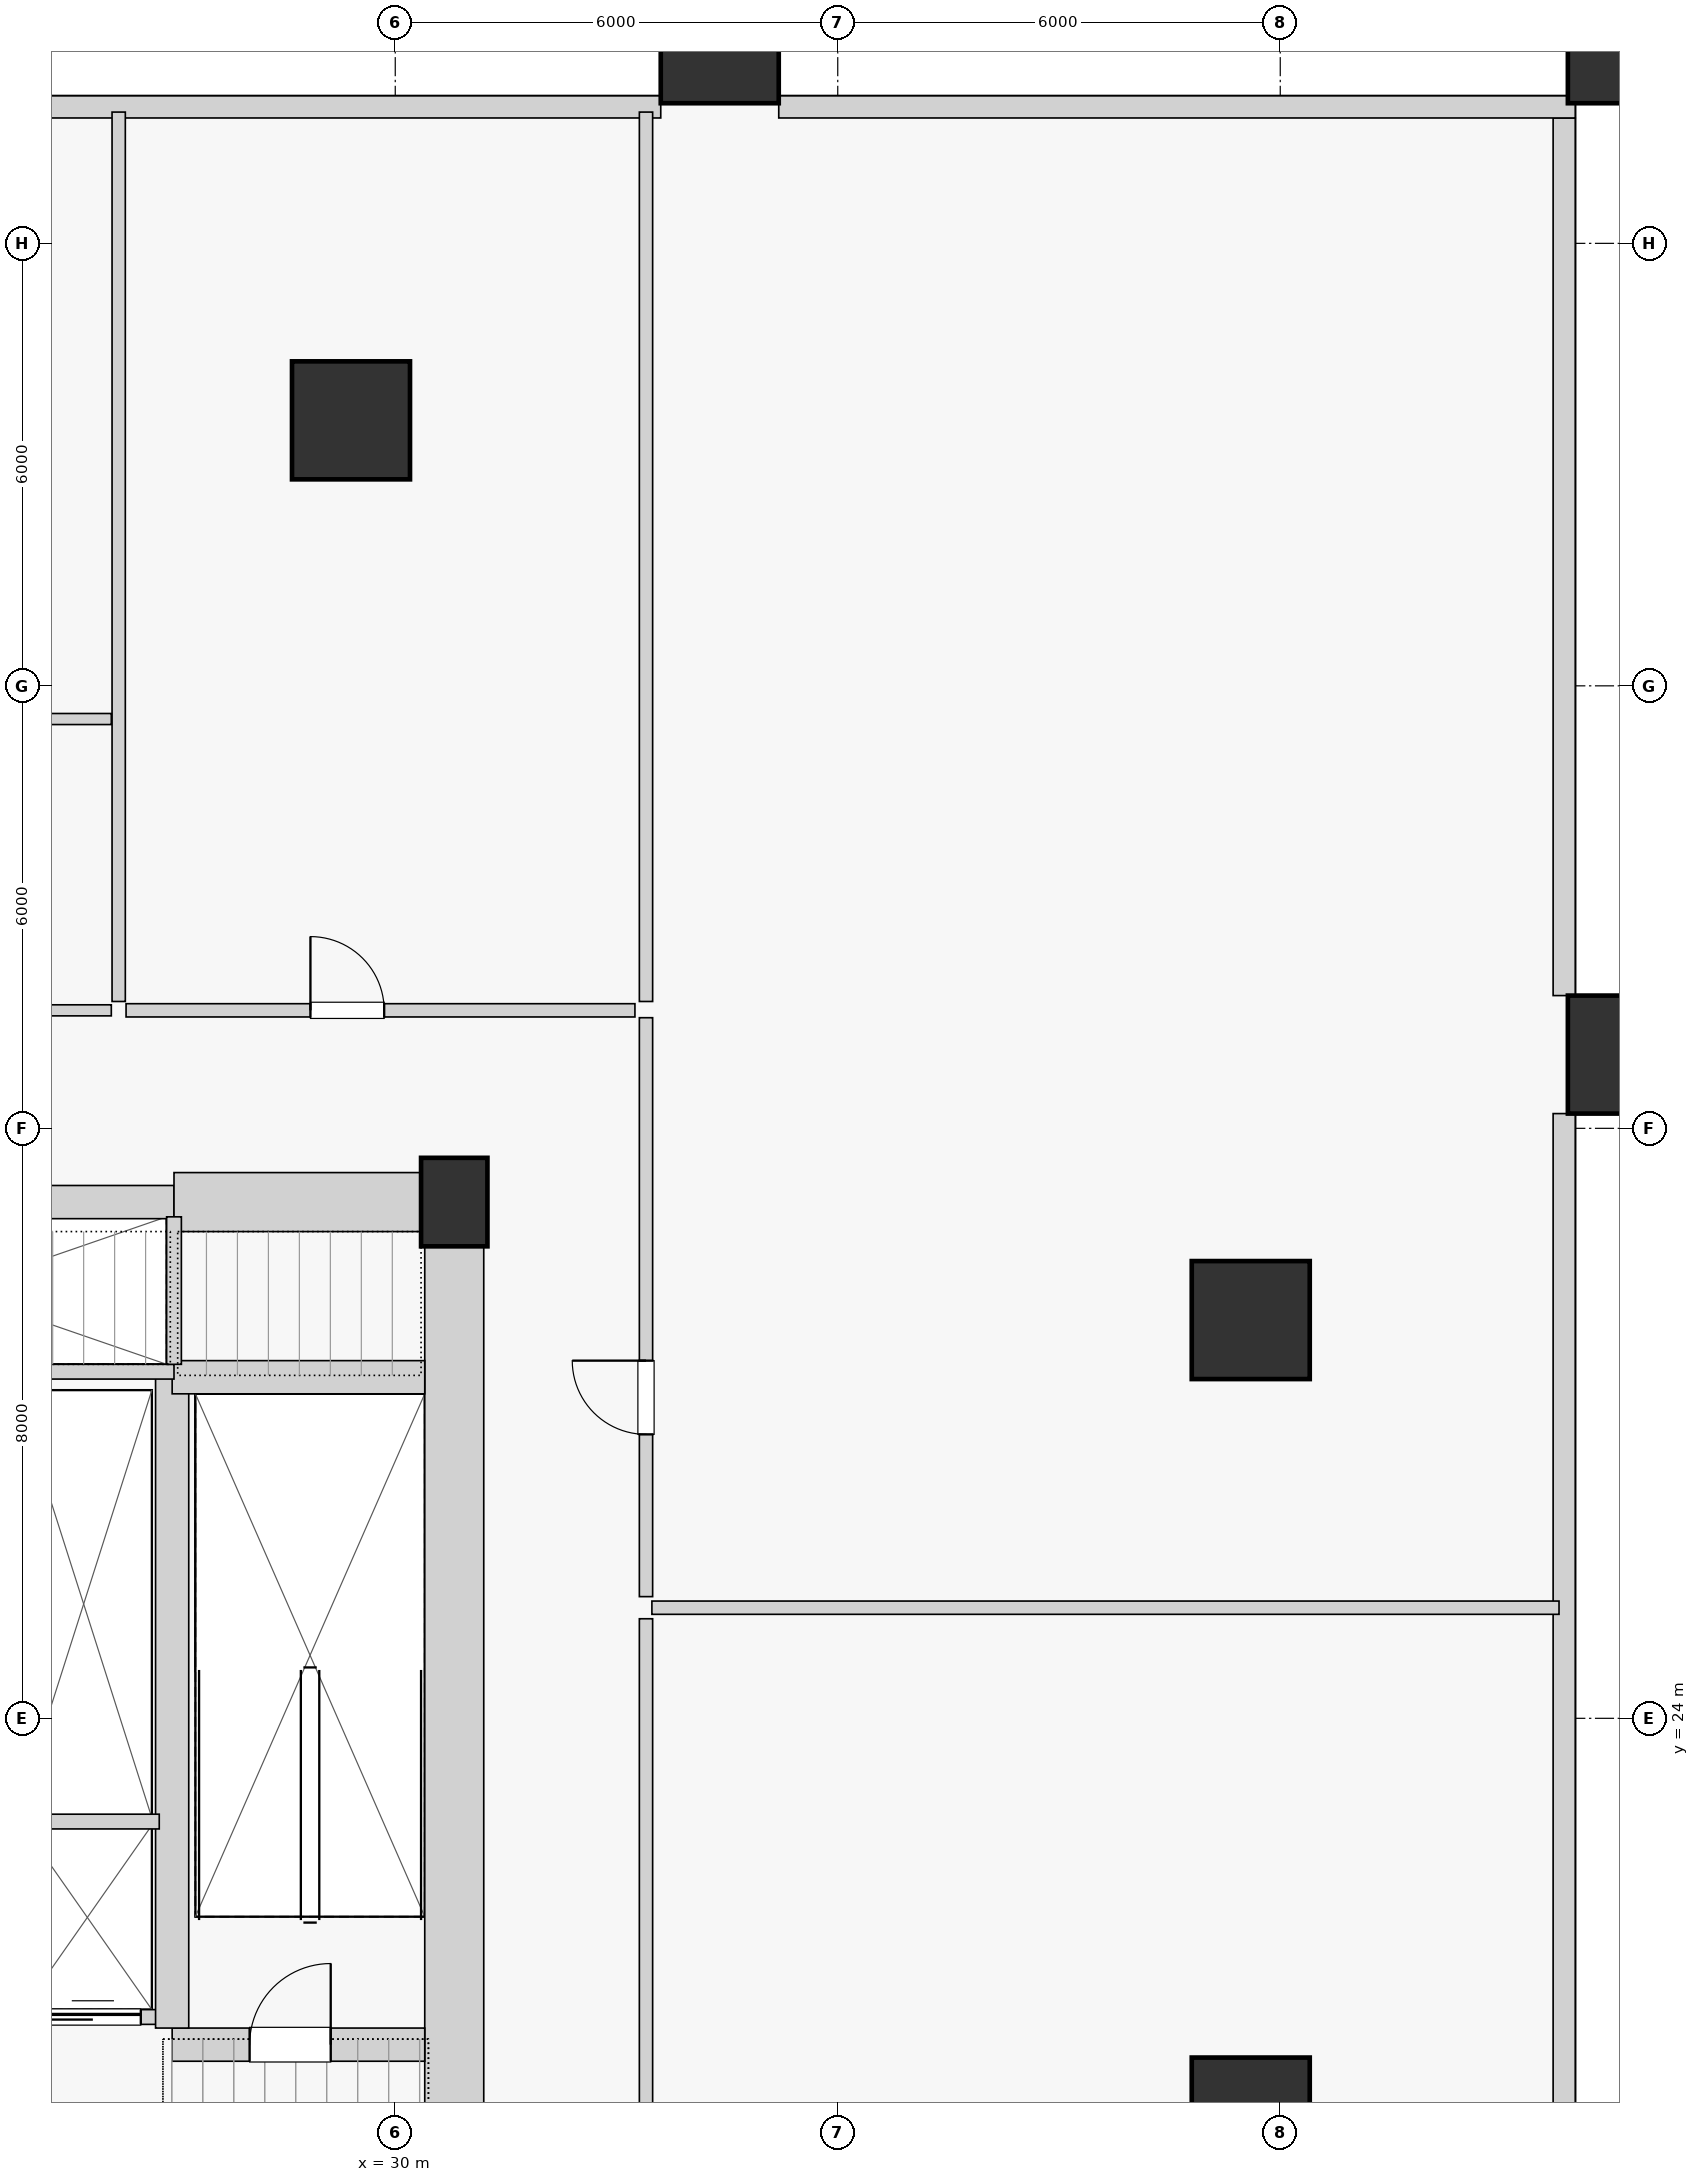
"""IFC4 building model, lengths in metres.
Left out: names, types, materials, properties, quantities, classifications, styles, units other than length and angle.
Written with IfcOpenShell. Run it as: python <this file> out.ifc"""

import sys

from ifc_helpers import new_model, si_unit, direction, frame, frame_2d, origin, origin_2d, place, context, subcontext, project, spatial, rectangle, extrude, source, transform, mapped, element, fill, save


model = new_model("IFC4")
c1 = context("Model", 3, precision=1e-05, world=origin(), true_north=direction((0.0, 1.0)))
c2 = subcontext(c1, "Body", "Model", "MODEL_VIEW")
j1 = project(units=[si_unit("LENGTHUNIT", "METRE"), si_unit("PLANEANGLEUNIT", "RADIAN")], contexts=[c1])
p1 = place(None, origin())
s1 = spatial("IfcSite", under=j1, at=p1, CompositionType="ELEMENT")
p2 = place(p1, origin())
s2 = spatial("IfcBuilding", under=s1, at=p2, CompositionType="ELEMENT")
p3 = place(p2, frame((0.0, 0.0, 18.4)))
s3 = spatial("IfcBuildingStorey", under=s2, at=p3, CompositionType="ELEMENT", Elevation=18.4)
p4 = place(p3, frame((30.8, 31.0, 0.0), z_axis=(0.0, 0.0, 1.0), x_axis=(1.0, 0.0, 0.0)))
e1 = element("IfcColumn", 1, at=p4, inside=s3, PredefinedType="PILASTER", context=c2, shape_type="SweptSolid", body=[
    extrude(rectangle(XDim=0.9, YDim=1.2, at=origin_2d()), origin(), (0.0, 0.0, 1.0), 4.4),
])
for number, where, z_axis, x_axis in (
    (2, (46.7, 33.0, 0.0), (0.0, 0.0, 1.0), (1.0, 0.0, 0.0)),
    (3, (34.4, 46.7, 0.0), (0.0, 0.0, 1.0), (1.0, 0.0, 0.0)),
    (4, (46.7, 46.7, 0.0), (0.0, 0.0, 1.0), (1.0, 0.0, 0.0)),
    (5, (41.6, 18.6, 0.0), (0.0, 0.0, 1.0), (1.0, 0.0, 0.0)),
    (6, (41.6, 29.4, 0.0), (0.0, 0.0, 1.0), (1.0, 0.0, 0.0)),
    (7, (29.4, 41.6, 0.0), (0.0, 0.0, 1.0), (1.0, 0.0, 0.0)),
):
    element("IfcColumn", number, at=place(p3, frame(where, z_axis=z_axis, x_axis=x_axis)), inside=s3, PredefinedType="COLUMN", context=c2, shape_type="SweptSolid", body=[
        extrude(rectangle(XDim=1.6, YDim=1.6, at=origin_2d()), origin(), (0.0, 0.0, 1.0), 4.4),
    ])
p5 = place(p3, frame((45.85, 15.8, 0.0), z_axis=(0.0, 0.0, 1.0), x_axis=(0.0, 1.0, 0.0)))
e8 = element("IfcWall", 8, at=p5, inside=s3, PredefinedType="SOLIDWALL", context=c2, shape_type="SweptSolid", body=[
    extrude(rectangle(XDim=16.4, YDim=0.3, at=frame_2d((8.2, 0.0))), origin(), (0.0, 0.0, 1.0), 2.95),
])
p6 = place(p5, frame((7.15, 0.0, 0.85)))
e9 = element("IfcOpeningElement", 9, at=p6, cuts=e8, PredefinedType="OPENING", context=c2, shape_type="SweptSolid", body=[
    extrude(rectangle(XDim=2.1, YDim=1.75, at=frame_2d((1.05, 0.875))), frame((0.0, 0.16, 0.0), z_axis=(0.0, -1.0, 0.0), x_axis=(1.0, 0.0, 0.0)), (0.0, 0.0, 1.0), 0.32),
])
p7 = place(p3, frame((45.85, 33.8, 0.0), z_axis=(0.0, 0.0, 1.0), x_axis=(0.0, 1.0, 0.0)))
e10 = element("IfcWall", 10, at=p7, inside=s3, PredefinedType="SOLIDWALL", context=c2, shape_type="SweptSolid", body=[
    extrude(rectangle(XDim=11.9, YDim=0.3, at=frame_2d((5.95, 0.0))), origin(), (0.0, 0.0, 1.0), 2.95),
])
p8 = place(p7, frame((4.75, 0.0, 0.85)))
e11 = element("IfcOpeningElement", 11, at=p8, cuts=e10, PredefinedType="OPENING", context=c2, shape_type="SweptSolid", body=[
    extrude(rectangle(XDim=2.1, YDim=1.75, at=frame_2d((1.05, 0.875))), frame((0.0, 0.16, 0.0), z_axis=(0.0, -1.0, 0.0), x_axis=(1.0, 0.0, 0.0)), (0.0, 0.0, 1.0), 0.32),
])
p9 = place(p3, frame((46.0, 45.85, 0.0), z_axis=(0.0, 0.0, 1.0), x_axis=(-1.0, 0.0, 0.0)))
e12 = element("IfcWall", 12, at=p9, inside=s3, PredefinedType="SOLIDWALL", context=c2, shape_type="SweptSolid", body=[
    extrude(rectangle(XDim=10.8, YDim=0.3, at=frame_2d((5.4, 0.0))), origin(), (0.0, 0.0, 1.0), 2.95),
])
p10 = place(p9, frame((4.9, 0.0, 0.85)))
e13 = element("IfcOpeningElement", 13, at=p10, cuts=e12, PredefinedType="OPENING", context=c2, shape_type="SweptSolid", body=[
    extrude(rectangle(XDim=2.1, YDim=1.75, at=frame_2d((1.05, 0.875))), frame((0.0, 0.16, 0.0), z_axis=(0.0, -1.0, 0.0), x_axis=(1.0, 0.0, 0.0)), (0.0, 0.0, 1.0), 0.32),
])
p11 = place(p3, frame((33.6, 45.85, 0.0), z_axis=(0.0, 0.0, 1.0), x_axis=(-1.0, 0.0, 0.0)))
e14 = element("IfcWall", 14, at=p11, inside=s3, PredefinedType="SOLIDWALL", context=c2, shape_type="SweptSolid", body=[
    extrude(rectangle(XDim=8.8, YDim=0.3, at=frame_2d((4.4, 0.0))), origin(), (0.0, 0.0, 1.0), 2.95),
])
p12 = place(p11, frame((3.6, 0.0, 0.85)))
e15 = element("IfcOpeningElement", 15, at=p12, cuts=e14, PredefinedType="OPENING", context=c2, shape_type="SweptSolid", body=[
    extrude(rectangle(XDim=1.5, YDim=1.6, at=frame_2d((0.75, 0.8))), frame((0.0, 0.16, 0.0), z_axis=(0.0, -1.0, 0.0), x_axis=(1.0, 0.0, 0.0)), (0.0, 0.0, 1.0), 0.32),
])
p13 = place(p3, frame((30.8, 16.8, 0.0), z_axis=(0.0, 0.0, 1.0), x_axis=(0.0, 1.0, 0.0)))
e16 = element("IfcWall", 16, at=p13, inside=s3, PredefinedType="SHEAR", context=c2, shape_type="SweptSolid", body=[
    extrude(rectangle(XDim=14.2, YDim=0.8, at=frame_2d((7.1, 0.0))), origin(), (0.0, 0.0, 1.0), 4.05),
])
p14 = place(p3, frame((21.0, 31.0, 0.0), z_axis=(0.0, 0.0, 1.0), x_axis=(1.0, 0.0, 0.0)))
e17 = element("IfcWall", 17, at=p14, inside=s3, PredefinedType="SHEAR", context=c2, shape_type="SweptSolid", body=[
    extrude(rectangle(XDim=6.0, YDim=0.45, at=frame_2d((3.0, 0.0))), origin(), (0.0, 0.0, 1.0), 4.05),
])
p15 = place(p3, frame((27.0, 31.0, 0.0), z_axis=(0.0, 0.0, 1.0), x_axis=(1.0, 0.0, 0.0)))
e18 = element("IfcWall", 18, at=p15, inside=s3, PredefinedType="SHEAR", context=c2, shape_type="SweptSolid", body=[
    extrude(rectangle(XDim=3.8, YDim=0.8, at=frame_2d((1.9, 0.0))), origin(), (0.0, 0.0, 1.0), 4.05),
])
p16 = place(p3, frame((24.95, 19.95, 0.0), z_axis=(0.0, 0.0, 1.0), x_axis=(1.0, 0.0, 0.0)))
e19 = element("IfcWall", 19, at=p16, inside=s3, PredefinedType="SOLIDWALL", context=c2, shape_type="SweptSolid", body=[
    extrude(rectangle(XDim=1.85, YDim=0.2, at=frame_2d((0.925, 0.0))), origin(), (0.0, 0.0, 1.0), 4.05),
])
p17 = place(p16, frame((0.3, 0.0, 0.0)))
e20 = element("IfcOpeningElement", 20, at=p17, cuts=e19, PredefinedType="OPENING", context=c2, shape_type="SweptSolid", body=[
    extrude(rectangle(XDim=1.3, YDim=2.25, at=frame_2d((0.65, 1.125))), frame((0.0, 0.11, 0.0), z_axis=(0.0, -1.0, 0.0), x_axis=(1.0, 0.0, 0.0)), (0.0, 0.0, 1.0), 0.22),
])
p18 = place(p3, frame((26.975, 19.575, 0.0), z_axis=(0.0, 0.0, 1.0), x_axis=(1.0, 0.0, 0.0)))
e21 = element("IfcWall", 21, at=p18, inside=s3, PredefinedType="SHEAR", context=c2, shape_type="SweptSolid", body=[
    extrude(rectangle(XDim=3.425, YDim=0.45, at=frame_2d((1.712, 0.0))), origin(), (0.0, 0.0, 1.0), 4.05),
])
p19 = place(p18, frame((1.05, 0.0, 0.0)))
e22 = element("IfcOpeningElement", 22, at=p19, cuts=e21, PredefinedType="OPENING", context=c2, shape_type="SweptSolid", body=[
    extrude(rectangle(XDim=1.1, YDim=2.03, at=frame_2d((0.55, 1.015))), frame((0.0, 0.235, 0.0), z_axis=(0.0, -1.0, 0.0), x_axis=(1.0, 0.0, 0.0)), (0.0, 0.0, 1.0), 0.47),
])
p20 = place(p3, frame((26.975, 19.8, 0.0), z_axis=(0.0, 0.0, 1.0), x_axis=(0.0, 1.0, 0.0)))
e23 = element("IfcWall", 23, at=p20, inside=s3, PredefinedType="SHEAR", context=c2, shape_type="SweptSolid", body=[
    extrude(rectangle(XDim=8.825, YDim=0.45, at=frame_2d((4.413, 0.0))), origin(), (0.0, 0.0, 1.0), 4.05),
])
p21 = place(p3, frame((26.975, 28.625, 0.0), z_axis=(0.0, 0.0, 1.0), x_axis=(1.0, 0.0, 0.0)))
e24 = element("IfcWall", 24, at=p21, inside=s3, PredefinedType="SHEAR", context=c2, shape_type="SweptSolid", body=[
    extrude(rectangle(XDim=3.425, YDim=0.45, at=frame_2d((1.712, 0.0))), origin(), (0.0, 0.0, 1.0), 4.05),
])
p22 = place(p3, frame((24.85, 22.6, 0.0), z_axis=(0.0, 0.0, 1.0), x_axis=(1.0, 0.0, 0.0)))
e25 = element("IfcWall", 25, at=p22, inside=s3, PredefinedType="SOLIDWALL", context=c2, shape_type="SweptSolid", body=[
    extrude(rectangle(XDim=1.95, YDim=0.2, at=frame_2d((0.975, 0.0))), origin(), (0.0, 0.0, 1.0), 4.05),
])
p23 = place(p3, frame((21.0, 28.7, 0.0), z_axis=(0.0, 0.0, 1.0), x_axis=(1.0, 0.0, 0.0)))
e26 = element("IfcWall", 26, at=p23, inside=s3, PredefinedType="SOLIDWALL", context=c2, shape_type="SweptSolid", body=[
    extrude(rectangle(XDim=6.0, YDim=0.2, at=frame_2d((3.0, 0.0))), origin(), (0.0, 0.0, 1.0), 4.05),
])
p24 = place(p3, frame((27.0, 28.8, 0.0), z_axis=(0.0, 0.0, 1.0), x_axis=(0.0, 1.0, 0.0)))
e27 = element("IfcWall", 27, at=p24, inside=s3, PredefinedType="SOLIDWALL", context=c2, shape_type="SweptSolid", body=[
    extrude(rectangle(XDim=2.0, YDim=0.2, at=frame_2d((1.0, 0.0))), origin(), (0.0, 0.0, 1.0), 4.05),
])
p25 = place(p3, frame((33.4, 14.3, 0.0), z_axis=(0.0, 0.0, 1.0), x_axis=(0.0, 1.0, 0.0)))
e28 = element("IfcWall", 28, at=p25, inside=s3, PredefinedType="PARTITIONING", context=c2, shape_type="SweptSolid", body=[
    extrude(rectangle(XDim=11.05, YDim=0.18, at=frame_2d((5.525, 0.0))), origin(), (0.0, 0.0, 1.0), 4.05),
])
p26 = place(p25, frame((2.2, 0.0, 0.0)))
e29 = element("IfcOpeningElement", 29, at=p26, cuts=e28, PredefinedType="OPENING", context=c2, shape_type="SweptSolid", body=[
    extrude(rectangle(XDim=1.0, YDim=2.01, at=frame_2d((0.5, 1.005))), frame((0.0, 0.1, 0.0), z_axis=(0.0, -1.0, 0.0), x_axis=(1.0, 0.0, 0.0)), (0.0, 0.0, 1.0), 0.2),
])
p27 = place(p3, frame((33.4, 25.65, 0.0), z_axis=(0.0, 0.0, 1.0), x_axis=(0.0, 1.0, 0.0)))
e30 = element("IfcWall", 30, at=p27, inside=s3, PredefinedType="PARTITIONING", context=c2, shape_type="SweptSolid", body=[
    extrude(rectangle(XDim=7.85, YDim=0.18, at=frame_2d((3.925, 0.0))), origin(), (0.0, 0.0, 1.0), 4.05),
])
p28 = place(p27, frame((2.2, 0.0, 0.0)))
e31 = element("IfcOpeningElement", 31, at=p28, cuts=e30, PredefinedType="OPENING", context=c2, shape_type="SweptSolid", body=[
    extrude(rectangle(XDim=1.0, YDim=2.01, at=frame_2d((0.5, 1.005))), frame((0.0, 0.1, 0.0), z_axis=(0.0, -1.0, 0.0), x_axis=(1.0, 0.0, 0.0)), (0.0, 0.0, 1.0), 0.2),
])
p29 = place(p3, frame((33.48, 25.5, 0.0), z_axis=(0.0, 0.0, 1.0), x_axis=(1.0, 0.0, 0.0)))
e32 = element("IfcWall", 32, at=p29, inside=s3, PredefinedType="PARTITIONING", context=c2, shape_type="SweptSolid", body=[
    extrude(rectangle(XDim=12.3, YDim=0.18, at=frame_2d((6.15, 0.0))), origin(), (0.0, 0.0, 1.0), 4.05),
])
p30 = place(p3, frame((21.95, 33.6, 0.0), z_axis=(0.0, 0.0, 1.0), x_axis=(1.0, 0.0, 0.0)))
e33 = element("IfcWall", 33, at=p30, inside=s3, PredefinedType="PARTITIONING", context=c2, shape_type="SweptSolid", body=[
    extrude(rectangle(XDim=4.2, YDim=0.15, at=frame_2d((2.1, 0.0))), origin(), (0.0, 0.0, 1.0), 4.05),
])
p31 = place(p30, frame((1.5, 0.0, 0.0)))
e34 = element("IfcOpeningElement", 34, at=p31, cuts=e33, PredefinedType="OPENING", context=c2, shape_type="SweptSolid", body=[
    extrude(rectangle(XDim=1.0, YDim=2.01, at=frame_2d((0.5, 1.005))), frame((0.0, 0.085, 0.0), z_axis=(0.0, -1.0, 0.0), x_axis=(1.0, 0.0, 0.0)), (0.0, 0.0, 1.0), 0.17),
])
p32 = place(p3, frame((26.35, 33.6, 0.0), z_axis=(0.0, 0.0, 1.0), x_axis=(1.0, 0.0, 0.0)))
e35 = element("IfcWall", 35, at=p32, inside=s3, PredefinedType="PARTITIONING", context=c2, shape_type="SweptSolid", body=[
    extrude(rectangle(XDim=6.9, YDim=0.18, at=frame_2d((3.45, 0.0))), origin(), (0.0, 0.0, 1.0), 4.05),
])
p33 = place(p32, frame((2.5, 0.0, 0.0)))
e36 = element("IfcOpeningElement", 36, at=p33, cuts=e35, PredefinedType="OPENING", context=c2, shape_type="SweptSolid", body=[
    extrude(rectangle(XDim=1.0, YDim=2.01, at=frame_2d((0.5, 1.005))), frame((0.0, 0.1, 0.0), z_axis=(0.0, -1.0, 0.0), x_axis=(1.0, 0.0, 0.0)), (0.0, 0.0, 1.0), 0.2),
])
for number, where, z_axis, x_axis in (
    (37, (26.25, 33.72, 0.0), (0.0, 0.0, 1.0), (0.0, 1.0, 0.0)),
    (38, (33.4, 33.72, 0.0), (0.0, 0.0, 1.0), (0.0, 1.0, 0.0)),
):
    element("IfcWall", number, at=place(p3, frame(where, z_axis=z_axis, x_axis=x_axis)), inside=s3, PredefinedType="PARTITIONING", context=c2, shape_type="SweptSolid", body=[
        extrude(rectangle(XDim=12.06, YDim=0.18, at=frame_2d((6.03, 0.0))), origin(), (0.0, 0.0, 1.0), 4.05),
    ])
p34 = place(p3, frame((17.0, 37.55, 0.0), z_axis=(0.0, 0.0, 1.0), x_axis=(1.0, 0.0, 0.0)))
e39 = element("IfcWall", 39, at=p34, inside=s3, PredefinedType="PARTITIONING", context=c2, shape_type="SweptSolid", body=[
    extrude(rectangle(XDim=9.15, YDim=0.15, at=frame_2d((4.575, 0.0))), origin(), (0.0, 0.0, 1.0), 4.05),
])
m1 = source(origin(), c2, "Body", "SweptSolid", [
    extrude(rectangle(XDim=2.1, YDim=1.75, at=frame_2d((1.05, 0.875))), frame((0.0, 0.03, 0.0), z_axis=(0.0, -1.0, 0.0), x_axis=(1.0, 0.0, 0.0)), (0.0, 0.0, 1.0), 0.06),
])
p35 = place(p6, origin())
e40 = element("IfcWindow", 40, at=p35, inside=s3, PartitioningType="DOUBLE_PANEL_VERTICAL", PredefinedType="WINDOW", context=c2, shape_type="MappedRepresentation", body=[
    mapped(m1, transform((0.0, 0.0, 0.0), scale=1.0)),
])
fill(e9, e40)
p36 = place(p8, origin())
e41 = element("IfcWindow", 41, at=p36, inside=s3, PartitioningType="DOUBLE_PANEL_VERTICAL", PredefinedType="WINDOW", context=c2, shape_type="MappedRepresentation", body=[
    mapped(m1, transform((0.0, 0.0, 0.0), scale=1.0)),
])
fill(e11, e41)
p37 = place(p10, origin())
e42 = element("IfcWindow", 42, at=p37, inside=s3, PartitioningType="DOUBLE_PANEL_VERTICAL", PredefinedType="WINDOW", context=c2, shape_type="MappedRepresentation", body=[
    mapped(m1, transform((0.0, 0.0, 0.0), scale=1.0)),
])
fill(e13, e42)
m2 = source(origin(), c2, "Body", "SweptSolid", [
    extrude(rectangle(XDim=1.5, YDim=1.6, at=frame_2d((0.75, 0.8))), frame((0.0, 0.03, 0.0), z_axis=(0.0, -1.0, 0.0), x_axis=(1.0, 0.0, 0.0)), (0.0, 0.0, 1.0), 0.06),
])
p38 = place(p12, origin())
e43 = element("IfcWindow", 43, at=p38, inside=s3, PartitioningType="DOUBLE_PANEL_VERTICAL", PredefinedType="WINDOW", context=c2, shape_type="MappedRepresentation", body=[
    mapped(m2, transform((0.0, 0.0, 0.0), scale=1.0)),
])
fill(e15, e43)
m3 = source(origin(), c2, "Body", "SweptSolid", [
    extrude(rectangle(XDim=1.3, YDim=2.25, at=frame_2d((0.65, 1.125))), frame((0.0, 0.025, 0.0), z_axis=(0.0, -1.0, 0.0), x_axis=(1.0, 0.0, 0.0)), (0.0, 0.0, 1.0), 0.05),
])
p39 = place(p17, origin())
e44 = element("IfcDoor", 44, at=p39, inside=s3, OperationType="SLIDING_TO_LEFT", PredefinedType="DOOR", context=c2, shape_type="MappedRepresentation", body=[
    mapped(m3, transform((0.0, 0.0, 0.0), scale=1.0)),
])
fill(e20, e44)
m4 = source(origin(), c2, "Body", "SweptSolid", [
    extrude(rectangle(XDim=1.1, YDim=2.03, at=frame_2d((0.55, 1.015))), frame((0.0, 0.025, 0.0), z_axis=(0.0, -1.0, 0.0), x_axis=(1.0, 0.0, 0.0)), (0.0, 0.0, 1.0), 0.05),
])
p40 = place(p19, origin())
e45 = element("IfcDoor", 45, at=p40, inside=s3, OperationType="SINGLE_SWING_RIGHT", PredefinedType="DOOR", context=c2, shape_type="MappedRepresentation", body=[
    mapped(m4, transform((0.0, 0.0, 0.0), scale=1.0)),
])
fill(e22, e45)
m5 = source(origin(), c2, "Body", "SweptSolid", [
    extrude(rectangle(XDim=1.0, YDim=2.01, at=frame_2d((0.5, 1.005))), frame((0.0, 0.025, 0.0), z_axis=(0.0, -1.0, 0.0), x_axis=(1.0, 0.0, 0.0)), (0.0, 0.0, 1.0), 0.05),
])
p41 = place(p28, origin())
e46 = element("IfcDoor", 46, at=p41, inside=s3, OperationType="SINGLE_SWING_RIGHT", PredefinedType="DOOR", context=c2, shape_type="MappedRepresentation", body=[
    mapped(m5, transform((0.0, 0.0, 0.0), scale=1.0)),
])
fill(e31, e46)
p42 = place(p33, origin())
e47 = element("IfcDoor", 47, at=p42, inside=s3, OperationType="SINGLE_SWING_LEFT", PredefinedType="DOOR", context=c2, shape_type="MappedRepresentation", body=[
    mapped(m5, transform((0.0, 0.0, 0.0), scale=1.0)),
])
fill(e36, e47)
save(model, sys.argv[1])
